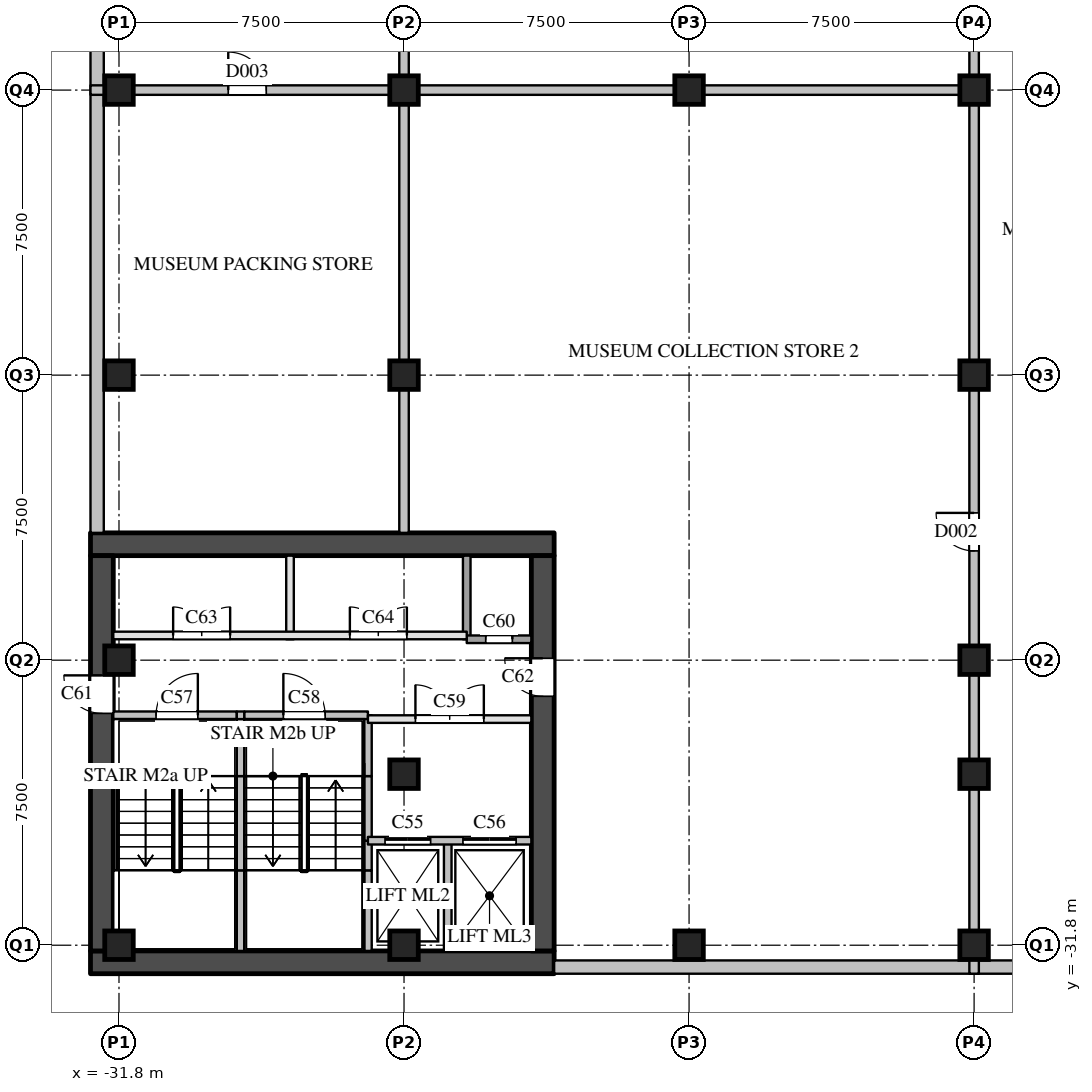
"""IFC4 building model, lengths in metres.
Left out: names, types, materials, properties, quantities, classifications, styles, units other than length and angle.
Written with IfcOpenShell. Run it as: python <this file> out.ifc"""

import sys

from ifc_helpers import new_model, si_unit, direction, frame, frame_2d, origin, origin_2d, place, context, subcontext, project, spatial, rectangle, extrude, element, fill, save


model = new_model("IFC4")
c1 = context("Model", 3, precision=1e-05, world=origin(), true_north=direction((0.0, 1.0)))
c2 = subcontext(c1, "Body", "Model", "MODEL_VIEW")
j1 = project(units=[si_unit("LENGTHUNIT", "METRE"), si_unit("PLANEANGLEUNIT", "RADIAN")], contexts=[c1])
p1 = place(None, origin())
s1 = spatial("IfcSite", under=j1, at=p1, CompositionType="ELEMENT")
p2 = place(p1, origin())
s2 = spatial("IfcBuilding", under=s1, at=p2, CompositionType="ELEMENT")
p3 = place(p2, frame((0.0, 0.0, -6.0)))
s3 = spatial("IfcBuildingStorey", under=s2, at=p3, CompositionType="ELEMENT", Elevation=-6.0)
p4 = place(p3, frame((-32.375, -20.95, 0.0), z_axis=(0.0, 0.0, 1.0), x_axis=(0.0, 1.0, 0.0)))
e1 = element("IfcWall", 1, at=p4, inside=s3, PredefinedType="SOLIDWALL", context=c2, shape_type="SweptSolid", body=[
    extrude(rectangle(XDim=68.3, YDim=0.35, at=frame_2d((34.15, 0.0))), origin(), (0.0, 0.0, 1.0), 5.59),
])
p5 = place(p3, frame((1.75, -32.375, 0.0), z_axis=(0.0, 0.0, 1.0), x_axis=(-1.0, 0.0, 0.0)))
e2 = element("IfcWall", 2, at=p5, inside=s3, PredefinedType="SOLIDWALL", context=c2, shape_type="SweptSolid", body=[
    extrude(rectangle(XDim=22.1, YDim=0.35, at=frame_2d((11.05, 0.0))), origin(), (0.0, 0.0, 1.0), 5.59),
])
for number, where, z_axis, x_axis in (
    (3, (-31.8, -31.8, 0.0), (0.0, 0.0, 1.0), (1.0, 0.0, 0.0)),
    (4, (-31.8, -24.3, 0.0), (0.0, 0.0, 1.0), (1.0, 0.0, 0.0)),
    (5, (-31.8, -16.8, 0.0), (0.0, 0.0, 1.0), (1.0, 0.0, 0.0)),
    (6, (-31.8, -9.3, 0.0), (0.0, 0.0, 1.0), (1.0, 0.0, 0.0)),
    (7, (-24.3, -31.8, 0.0), (0.0, 0.0, 1.0), (1.0, 0.0, 0.0)),
    (8, (-24.3, -16.8, 0.0), (0.0, 0.0, 1.0), (1.0, 0.0, 0.0)),
    (9, (-24.3, -9.3, 0.0), (0.0, 0.0, 1.0), (1.0, 0.0, 0.0)),
    (10, (-16.8, -31.8, 0.0), (0.0, 0.0, 1.0), (1.0, 0.0, 0.0)),
    (11, (-16.8, -9.3, 0.0), (0.0, 0.0, 1.0), (1.0, 0.0, 0.0)),
    (12, (-9.3, -31.8, 0.0), (0.0, 0.0, 1.0), (1.0, 0.0, 0.0)),
    (13, (-9.3, -24.3, 0.0), (0.0, 0.0, 1.0), (1.0, 0.0, 0.0)),
    (14, (-9.3, -16.8, 0.0), (0.0, 0.0, 1.0), (1.0, 0.0, 0.0)),
    (15, (-9.3, -9.3, 0.0), (0.0, 0.0, 1.0), (1.0, 0.0, 0.0)),
    (16, (-24.3, -27.3, 0.0), (0.0, 0.0, 1.0), (1.0, 0.0, 0.0)),
    (17, (-9.3, -27.3, 0.0), (0.0, 0.0, 1.0), (1.0, 0.0, 0.0)),
):
    element("IfcColumn", number, at=place(p3, frame(where, z_axis=z_axis, x_axis=x_axis)), inside=s3, PredefinedType="COLUMN", context=c2, shape_type="SweptSolid", body=[
        extrude(rectangle(XDim=0.75, YDim=0.75, at=origin_2d()), origin(), (0.0, 0.0, 1.0), 6.0),
    ])
for number, where, z_axis, x_axis in (
    (18, (-32.55, -32.25, 0.0), (0.0, 0.0, 1.0), (1.0, 0.0, 0.0)),
    (19, (-32.55, -21.25, 0.0), (0.0, 0.0, 1.0), (1.0, 0.0, 0.0)),
):
    element("IfcWall", number, at=place(p3, frame(where, z_axis=z_axis, x_axis=x_axis)), inside=s3, PredefinedType="SHEAR", context=c2, shape_type="SweptSolid", body=[
        extrude(rectangle(XDim=12.2, YDim=0.6, at=frame_2d((6.1, 0.0))), origin(), (0.0, 0.0, 1.0), 5.59),
    ])
p6 = place(p3, frame((-32.25, -31.95, 0.0), z_axis=(0.0, 0.0, 1.0), x_axis=(0.0, 1.0, 0.0)))
e20 = element("IfcWall", 20, at=p6, inside=s3, PredefinedType="SHEAR", context=c2, shape_type="SweptSolid", body=[
    extrude(rectangle(XDim=10.4, YDim=0.6, at=frame_2d((5.2, 0.0))), origin(), (0.0, 0.0, 1.0), 5.59),
])
p7 = place(p6, frame((6.25, 0.0, 0.0)))
e21 = element("IfcOpeningElement", 21, at=p7, cuts=e20, PredefinedType="OPENING", context=c2, shape_type="SweptSolid", body=[
    extrude(rectangle(XDim=1.0, YDim=2.1, at=frame_2d((0.5, 1.05))), frame((0.0, 0.31, 0.0), z_axis=(0.0, -1.0, 0.0), x_axis=(1.0, 0.0, 0.0)), (0.0, 0.0, 1.0), 0.62),
])
p8 = place(p3, frame((-20.65, -31.95, 0.0), z_axis=(0.0, 0.0, 1.0), x_axis=(0.0, 1.0, 0.0)))
e22 = element("IfcWall", 22, at=p8, inside=s3, PredefinedType="SHEAR", context=c2, shape_type="SweptSolid", body=[
    extrude(rectangle(XDim=10.4, YDim=0.6, at=frame_2d((5.2, 0.0))), origin(), (0.0, 0.0, 1.0), 5.59),
])
p9 = place(p8, frame((6.7, 0.0, 0.0)))
e23 = element("IfcOpeningElement", 23, at=p9, cuts=e22, PredefinedType="OPENING", context=c2, shape_type="SweptSolid", body=[
    extrude(rectangle(XDim=1.0, YDim=2.1, at=frame_2d((0.5, 1.05))), frame((0.0, 0.31, 0.0), z_axis=(0.0, -1.0, 0.0), x_axis=(1.0, 0.0, 0.0)), (0.0, 0.0, 1.0), 0.62),
])
p10 = place(p3, frame((-28.6, -31.95, 0.0), z_axis=(0.0, 0.0, 1.0), x_axis=(0.0, 1.0, 0.0)))
e24 = element("IfcWall", 24, at=p10, inside=s3, PredefinedType="SOLIDWALL", context=c2, shape_type="SweptSolid", body=[
    extrude(rectangle(XDim=2.12, YDim=0.2, at=frame_2d((1.06, 0.0))), origin(), (0.0, 0.0, 1.0), 5.59),
])
p11 = place(p3, frame((-28.6, -29.83, 0.0), z_axis=(0.0, 0.0, 1.0), x_axis=(0.0, 1.0, 0.0)))
e25 = element("IfcWall", 25, at=p11, inside=s3, PredefinedType="SOLIDWALL", context=c2, shape_type="SweptSolid", body=[
    extrude(rectangle(XDim=2.48, YDim=0.2, at=frame_2d((1.24, 0.0))), origin(), (0.0, 0.0, 1.0), 5.59),
])
p12 = place(p3, frame((-28.6, -27.35, 0.0), z_axis=(0.0, 0.0, 1.0), x_axis=(0.0, 1.0, 0.0)))
e26 = element("IfcWall", 26, at=p12, inside=s3, PredefinedType="SOLIDWALL", context=c2, shape_type="SweptSolid", body=[
    extrude(rectangle(XDim=1.6, YDim=0.2, at=frame_2d((0.8, 0.0))), origin(), (0.0, 0.0, 1.0), 5.59),
])
p13 = place(p3, frame((-27.3, -23.75, 0.0), z_axis=(0.0, 0.0, 1.0), x_axis=(0.0, 1.0, 0.0)))
e27 = element("IfcWall", 27, at=p13, inside=s3, PredefinedType="PARTITIONING", context=c2, shape_type="SweptSolid", body=[
    extrude(rectangle(XDim=2.2, YDim=0.2, at=frame_2d((1.1, 0.0))), origin(), (0.0, 0.0, 1.0), 5.59),
])
p14 = place(p3, frame((-25.25, -31.95, 0.0), z_axis=(0.0, 0.0, 1.0), x_axis=(0.0, 1.0, 0.0)))
e28 = element("IfcWall", 28, at=p14, inside=s3, PredefinedType="SOLIDWALL", context=c2, shape_type="SweptSolid", body=[
    extrude(rectangle(XDim=2.12, YDim=0.2, at=frame_2d((1.06, 0.0))), origin(), (0.0, 0.0, 1.0), 5.59),
])
p15 = place(p3, frame((-25.25, -29.83, 0.0), z_axis=(0.0, 0.0, 1.0), x_axis=(0.0, 1.0, 0.0)))
e29 = element("IfcWall", 29, at=p15, inside=s3, PredefinedType="SOLIDWALL", context=c2, shape_type="SweptSolid", body=[
    extrude(rectangle(XDim=0.78, YDim=0.2, at=frame_2d((0.39, 0.0))), origin(), (0.0, 0.0, 1.0), 5.59),
])
p16 = place(p3, frame((-25.25, -29.05, 0.0), z_axis=(0.0, 0.0, 1.0), x_axis=(0.0, 1.0, 0.0)))
e30 = element("IfcWall", 30, at=p16, inside=s3, PredefinedType="SOLIDWALL", context=c2, shape_type="SweptSolid", body=[
    extrude(rectangle(XDim=1.7, YDim=0.2, at=frame_2d((0.85, 0.0))), origin(), (0.0, 0.0, 1.0), 5.59),
])
p17 = place(p3, frame((-25.25, -27.35, 0.0), z_axis=(0.0, 0.0, 1.0), x_axis=(0.0, 1.0, 0.0)))
e31 = element("IfcWall", 31, at=p17, inside=s3, PredefinedType="SOLIDWALL", context=c2, shape_type="SweptSolid", body=[
    extrude(rectangle(XDim=1.6, YDim=0.2, at=frame_2d((0.8, 0.0))), origin(), (0.0, 0.0, 1.0), 5.59),
])
p18 = place(p3, frame((-23.15, -31.95, 0.0), z_axis=(0.0, 0.0, 1.0), x_axis=(0.0, 1.0, 0.0)))
e32 = element("IfcWall", 32, at=p18, inside=s3, PredefinedType="SOLIDWALL", context=c2, shape_type="SweptSolid", body=[
    extrude(rectangle(XDim=2.9, YDim=0.2, at=frame_2d((1.45, 0.0))), origin(), (0.0, 0.0, 1.0), 5.59),
])
p19 = place(p3, frame((-22.65, -23.75, 0.0), z_axis=(0.0, 0.0, 1.0), x_axis=(0.0, 1.0, 0.0)))
e33 = element("IfcWall", 33, at=p19, inside=s3, PredefinedType="SOLIDWALL", context=c2, shape_type="SweptSolid", body=[
    extrude(rectangle(XDim=2.2, YDim=0.2, at=frame_2d((1.1, 0.0))), origin(), (0.0, 0.0, 1.0), 5.59),
])
p20 = place(p3, frame((-25.25, -29.05, 0.0), z_axis=(0.0, 0.0, 1.0), x_axis=(1.0, 0.0, 0.0)))
e34 = element("IfcWall", 34, at=p20, inside=s3, PredefinedType="SOLIDWALL", context=c2, shape_type="SweptSolid", body=[
    extrude(rectangle(XDim=4.3, YDim=0.2, at=frame_2d((2.15, 0.0))), origin(), (0.0, 0.0, 1.0), 5.59),
])
p21 = place(p20, frame((0.45, 0.0, 0.0)))
e35 = element("IfcOpeningElement", 35, at=p21, cuts=e34, PredefinedType="OPENING", context=c2, shape_type="SweptSolid", body=[
    extrude(rectangle(XDim=1.2, YDim=2.1, at=frame_2d((0.6, 1.05))), frame((0.0, 0.11, 0.0), z_axis=(0.0, -1.0, 0.0), x_axis=(1.0, 0.0, 0.0)), (0.0, 0.0, 1.0), 0.22),
])
p22 = place(p20, frame((2.5, 0.0, 0.0)))
e36 = element("IfcOpeningElement", 36, at=p22, cuts=e34, PredefinedType="OPENING", context=c2, shape_type="SweptSolid", body=[
    extrude(rectangle(XDim=1.4, YDim=2.1, at=frame_2d((0.7, 1.05))), frame((0.0, 0.11, 0.0), z_axis=(0.0, -1.0, 0.0), x_axis=(1.0, 0.0, 0.0)), (0.0, 0.0, 1.0), 0.22),
])
p23 = place(p3, frame((-25.25, -25.85, 0.0), z_axis=(0.0, 0.0, 1.0), x_axis=(1.0, 0.0, 0.0)))
e37 = element("IfcWall", 37, at=p23, inside=s3, PredefinedType="PARTITIONING", context=c2, shape_type="SweptSolid", body=[
    extrude(rectangle(XDim=4.3, YDim=0.2, at=frame_2d((2.15, 0.0))), origin(), (0.0, 0.0, 1.0), 5.59),
])
p24 = place(p23, frame((1.25, 0.0, 0.0)))
e38 = element("IfcOpeningElement", 38, at=p24, cuts=e37, PredefinedType="OPENING", context=c2, shape_type="SweptSolid", body=[
    extrude(rectangle(XDim=1.8, YDim=2.1, at=frame_2d((0.9, 1.05))), frame((0.0, 0.11, 0.0), z_axis=(0.0, -1.0, 0.0), x_axis=(1.0, 0.0, 0.0)), (0.0, 0.0, 1.0), 0.22),
])
p25 = place(p3, frame((-31.95, -25.75, 0.0), z_axis=(0.0, 0.0, 1.0), x_axis=(1.0, 0.0, 0.0)))
e39 = element("IfcWall", 39, at=p25, inside=s3, PredefinedType="SOLIDWALL", context=c2, shape_type="SweptSolid", body=[
    extrude(rectangle(XDim=3.25, YDim=0.2, at=frame_2d((1.625, 0.0))), origin(), (0.0, 0.0, 1.0), 5.59),
])
p26 = place(p25, frame((1.125, 0.0, 0.0)))
e40 = element("IfcOpeningElement", 40, at=p26, cuts=e39, PredefinedType="OPENING", context=c2, shape_type="SweptSolid", body=[
    extrude(rectangle(XDim=1.1, YDim=2.1, at=frame_2d((0.55, 1.05))), frame((0.0, 0.11, 0.0), z_axis=(0.0, -1.0, 0.0), x_axis=(1.0, 0.0, 0.0)), (0.0, 0.0, 1.0), 0.22),
])
p27 = place(p3, frame((-28.7, -25.75, 0.0), z_axis=(0.0, 0.0, 1.0), x_axis=(1.0, 0.0, 0.0)))
e41 = element("IfcWall", 41, at=p27, inside=s3, PredefinedType="SOLIDWALL", context=c2, shape_type="SweptSolid", body=[
    extrude(rectangle(XDim=0.2, YDim=0.2, at=frame_2d((0.1, 0.0))), origin(), (0.0, 0.0, 1.0), 5.59),
])
p28 = place(p3, frame((-28.5, -25.75, 0.0), z_axis=(0.0, 0.0, 1.0), x_axis=(1.0, 0.0, 0.0)))
e42 = element("IfcWall", 42, at=p28, inside=s3, PredefinedType="SOLIDWALL", context=c2, shape_type="SweptSolid", body=[
    extrude(rectangle(XDim=3.25, YDim=0.2, at=frame_2d((1.625, 0.0))), origin(), (0.0, 0.0, 1.0), 5.59),
])
p29 = place(p28, frame((1.025, 0.0, 0.0)))
e43 = element("IfcOpeningElement", 43, at=p29, cuts=e42, PredefinedType="OPENING", context=c2, shape_type="SweptSolid", body=[
    extrude(rectangle(XDim=1.1, YDim=2.1, at=frame_2d((0.55, 1.05))), frame((0.0, 0.11, 0.0), z_axis=(0.0, -1.0, 0.0), x_axis=(1.0, 0.0, 0.0)), (0.0, 0.0, 1.0), 0.22),
])
p30 = place(p3, frame((-31.95, -23.65, 0.0), z_axis=(0.0, 0.0, 1.0), x_axis=(1.0, 0.0, 0.0)))
e44 = element("IfcWall", 44, at=p30, inside=s3, PredefinedType="PARTITIONING", context=c2, shape_type="SweptSolid", body=[
    extrude(rectangle(XDim=9.3, YDim=0.2, at=frame_2d((4.65, 0.0))), origin(), (0.0, 0.0, 1.0), 5.59),
])
p31 = place(p30, frame((1.575, 0.0, 0.0)))
e45 = element("IfcOpeningElement", 45, at=p31, cuts=e44, PredefinedType="OPENING", context=c2, shape_type="SweptSolid", body=[
    extrude(rectangle(XDim=1.5, YDim=2.1, at=frame_2d((0.75, 1.05))), frame((0.0, 0.11, 0.0), z_axis=(0.0, -1.0, 0.0), x_axis=(1.0, 0.0, 0.0)), (0.0, 0.0, 1.0), 0.22),
])
p32 = place(p30, frame((6.225, 0.0, 0.0)))
e46 = element("IfcOpeningElement", 46, at=p32, cuts=e44, PredefinedType="OPENING", context=c2, shape_type="SweptSolid", body=[
    extrude(rectangle(XDim=1.5, YDim=2.1, at=frame_2d((0.75, 1.05))), frame((0.0, 0.11, 0.0), z_axis=(0.0, -1.0, 0.0), x_axis=(1.0, 0.0, 0.0)), (0.0, 0.0, 1.0), 0.22),
])
p33 = place(p3, frame((-22.65, -23.75, 0.0), z_axis=(0.0, 0.0, 1.0), x_axis=(1.0, 0.0, 0.0)))
e47 = element("IfcWall", 47, at=p33, inside=s3, PredefinedType="SOLIDWALL", context=c2, shape_type="SweptSolid", body=[
    extrude(rectangle(XDim=1.7, YDim=0.2, at=frame_2d((0.85, 0.0))), origin(), (0.0, 0.0, 1.0), 5.59),
])
p34 = place(p33, frame((0.5, 0.0, 0.0)))
e48 = element("IfcOpeningElement", 48, at=p34, cuts=e47, PredefinedType="OPENING", context=c2, shape_type="SweptSolid", body=[
    extrude(rectangle(XDim=0.7, YDim=2.1, at=frame_2d((0.35, 1.05))), frame((0.0, 0.11, 0.0), z_axis=(0.0, -1.0, 0.0), x_axis=(1.0, 0.0, 0.0)), (0.0, 0.0, 1.0), 0.22),
])
p35 = place(p3, frame((-32.55, -9.3, 0.0), z_axis=(0.0, 0.0, 1.0), x_axis=(1.0, 0.0, 0.0)))
e49 = element("IfcWall", 49, at=p35, inside=s3, PredefinedType="PARTITIONING", context=c2, shape_type="SweptSolid", body=[
    extrude(rectangle(XDim=23.25, YDim=0.25, at=frame_2d((11.625, 0.0))), origin(), (0.0, 0.0, 1.0), 4.79),
])
p36 = place(p35, frame((3.625, 0.0, 0.0)))
e50 = element("IfcOpeningElement", 50, at=p36, cuts=e49, PredefinedType="OPENING", context=c2, shape_type="SweptSolid", body=[
    extrude(rectangle(XDim=1.0, YDim=2.1, at=frame_2d((0.5, 1.05))), frame((0.0, 0.135, 0.0), z_axis=(0.0, -1.0, 0.0), x_axis=(1.0, 0.0, 0.0)), (0.0, 0.0, 1.0), 0.27),
])
p37 = place(p3, frame((-24.3, -20.95, 0.0), z_axis=(0.0, 0.0, 1.0), x_axis=(0.0, 1.0, 0.0)))
e51 = element("IfcWall", 51, at=p37, inside=s3, PredefinedType="PARTITIONING", context=c2, shape_type="SweptSolid", body=[
    extrude(rectangle(XDim=32.95, YDim=0.25, at=frame_2d((16.475, 0.0))), origin(), (0.0, 0.0, 1.0), 4.79),
])
p38 = place(p37, frame((21.8, 0.0, 0.0)))
e52 = element("IfcOpeningElement", 52, at=p38, cuts=e51, PredefinedType="OPENING", context=c2, shape_type="SweptSolid", body=[
    extrude(rectangle(XDim=1.0, YDim=2.1, at=frame_2d((0.5, 1.05))), frame((0.0, 0.135, 0.0), z_axis=(0.0, -1.0, 0.0), x_axis=(1.0, 0.0, 0.0)), (0.0, 0.0, 1.0), 0.27),
])
p39 = place(p3, frame((-9.3, -32.55, 0.0), z_axis=(0.0, 0.0, 1.0), x_axis=(0.0, 1.0, 0.0)))
e53 = element("IfcWall", 53, at=p39, inside=s3, PredefinedType="PARTITIONING", context=c2, shape_type="SweptSolid", body=[
    extrude(rectangle(XDim=28.625, YDim=0.25, at=frame_2d((14.312, 0.0))), origin(), (0.0, 0.0, 1.0), 4.79),
])
p40 = place(p39, frame((11.125, 0.0, 0.0)))
e54 = element("IfcOpeningElement", 54, at=p40, cuts=e53, PredefinedType="OPENING", context=c2, shape_type="SweptSolid", body=[
    extrude(rectangle(XDim=1.0, YDim=2.1, at=frame_2d((0.5, 1.05))), frame((0.0, 0.135, 0.0), z_axis=(0.0, -1.0, 0.0), x_axis=(1.0, 0.0, 0.0)), (0.0, 0.0, 1.0), 0.27),
])
p41 = place(p21, origin())
e55 = element("IfcDoor", 55, at=p41, inside=s3, OperationType="SLIDING_TO_LEFT", PredefinedType="DOOR", context=c2, shape_type="SweptSolid", body=[
    extrude(rectangle(XDim=1.2, YDim=2.1, at=frame_2d((0.6, 1.05))), frame((0.0, 0.025, 0.0), z_axis=(0.0, -1.0, 0.0), x_axis=(1.0, 0.0, 0.0)), (0.0, 0.0, 1.0), 0.05),
])
fill(e35, e55)
p42 = place(p22, origin())
e56 = element("IfcDoor", 56, at=p42, inside=s3, OperationType="SLIDING_TO_LEFT", PredefinedType="DOOR", context=c2, shape_type="SweptSolid", body=[
    extrude(rectangle(XDim=1.4, YDim=2.1, at=frame_2d((0.7, 1.05))), frame((0.0, 0.025, 0.0), z_axis=(0.0, -1.0, 0.0), x_axis=(1.0, 0.0, 0.0)), (0.0, 0.0, 1.0), 0.05),
])
fill(e36, e56)
p43 = place(p26, origin())
e57 = element("IfcDoor", 57, at=p43, inside=s3, OperationType="SINGLE_SWING_RIGHT", PredefinedType="DOOR", context=c2, shape_type="SweptSolid", body=[
    extrude(rectangle(XDim=1.1, YDim=2.1, at=frame_2d((0.55, 1.05))), frame((0.0, 0.025, 0.0), z_axis=(0.0, -1.0, 0.0), x_axis=(1.0, 0.0, 0.0)), (0.0, 0.0, 1.0), 0.05),
])
fill(e40, e57)
p44 = place(p29, origin())
e58 = element("IfcDoor", 58, at=p44, inside=s3, OperationType="SINGLE_SWING_LEFT", PredefinedType="DOOR", context=c2, shape_type="SweptSolid", body=[
    extrude(rectangle(XDim=1.1, YDim=2.1, at=frame_2d((0.55, 1.05))), frame((0.0, 0.025, 0.0), z_axis=(0.0, -1.0, 0.0), x_axis=(1.0, 0.0, 0.0)), (0.0, 0.0, 1.0), 0.05),
])
fill(e43, e58)
p45 = place(p24, origin())
e59 = element("IfcDoor", 59, at=p45, inside=s3, OperationType="DOUBLE_DOOR_SINGLE_SWING", PredefinedType="DOOR", context=c2, shape_type="SweptSolid", body=[
    extrude(rectangle(XDim=1.8, YDim=2.1, at=frame_2d((0.9, 1.05))), frame((0.0, 0.025, 0.0), z_axis=(0.0, -1.0, 0.0), x_axis=(1.0, 0.0, 0.0)), (0.0, 0.0, 1.0), 0.05),
])
fill(e38, e59)
p46 = place(p34, origin())
e60 = element("IfcDoor", 60, at=p46, inside=s3, OperationType="SINGLE_SWING_RIGHT", PredefinedType="DOOR", context=c2, shape_type="SweptSolid", body=[
    extrude(rectangle(XDim=0.7, YDim=2.1, at=frame_2d((0.35, 1.05))), frame((0.0, 0.025, 0.0), z_axis=(0.0, -1.0, 0.0), x_axis=(1.0, 0.0, 0.0)), (0.0, 0.0, 1.0), 0.05),
])
fill(e48, e60)
p47 = place(p7, origin())
e61 = element("IfcDoor", 61, at=p47, inside=s3, OperationType="SINGLE_SWING_RIGHT", PredefinedType="DOOR", context=c2, shape_type="SweptSolid", body=[
    extrude(rectangle(XDim=1.0, YDim=2.1, at=frame_2d((0.5, 1.05))), frame((0.0, 0.025, 0.0), z_axis=(0.0, -1.0, 0.0), x_axis=(1.0, 0.0, 0.0)), (0.0, 0.0, 1.0), 0.05),
])
fill(e21, e61)
p48 = place(p9, origin())
e62 = element("IfcDoor", 62, at=p48, inside=s3, OperationType="SINGLE_SWING_RIGHT", PredefinedType="DOOR", context=c2, shape_type="SweptSolid", body=[
    extrude(rectangle(XDim=1.0, YDim=2.1, at=frame_2d((0.5, 1.05))), frame((0.0, 0.025, 0.0), z_axis=(0.0, -1.0, 0.0), x_axis=(1.0, 0.0, 0.0)), (0.0, 0.0, 1.0), 0.05),
])
fill(e23, e62)
p49 = place(p31, origin())
e63 = element("IfcDoor", 63, at=p49, inside=s3, OperationType="DOUBLE_DOOR_SINGLE_SWING", PredefinedType="DOOR", context=c2, shape_type="SweptSolid", body=[
    extrude(rectangle(XDim=1.5, YDim=2.1, at=frame_2d((0.75, 1.05))), frame((0.0, 0.025, 0.0), z_axis=(0.0, -1.0, 0.0), x_axis=(1.0, 0.0, 0.0)), (0.0, 0.0, 1.0), 0.05),
])
fill(e45, e63)
p50 = place(p32, origin())
e64 = element("IfcDoor", 64, at=p50, inside=s3, OperationType="DOUBLE_DOOR_SINGLE_SWING", PredefinedType="DOOR", context=c2, shape_type="SweptSolid", body=[
    extrude(rectangle(XDim=1.5, YDim=2.1, at=frame_2d((0.75, 1.05))), frame((0.0, 0.025, 0.0), z_axis=(0.0, -1.0, 0.0), x_axis=(1.0, 0.0, 0.0)), (0.0, 0.0, 1.0), 0.05),
])
fill(e46, e64)
p51 = place(p40, origin())
e65 = element("IfcDoor", 65, at=p51, inside=s3, OperationType="SINGLE_SWING_RIGHT", PredefinedType="DOOR", context=c2, shape_type="SweptSolid", body=[
    extrude(rectangle(XDim=1.0, YDim=2.1, at=frame_2d((0.5, 1.05))), frame((0.0, 0.025, 0.0), z_axis=(0.0, -1.0, 0.0), x_axis=(1.0, 0.0, 0.0)), (0.0, 0.0, 1.0), 0.05),
])
fill(e54, e65)
p52 = place(p36, origin())
e66 = element("IfcDoor", 66, at=p52, inside=s3, OperationType="SINGLE_SWING_LEFT", PredefinedType="DOOR", context=c2, shape_type="SweptSolid", body=[
    extrude(rectangle(XDim=1.0, YDim=2.1, at=frame_2d((0.5, 1.05))), frame((0.0, 0.025, 0.0), z_axis=(0.0, -1.0, 0.0), x_axis=(1.0, 0.0, 0.0)), (0.0, 0.0, 1.0), 0.05),
])
fill(e50, e66)
save(model, sys.argv[1])
